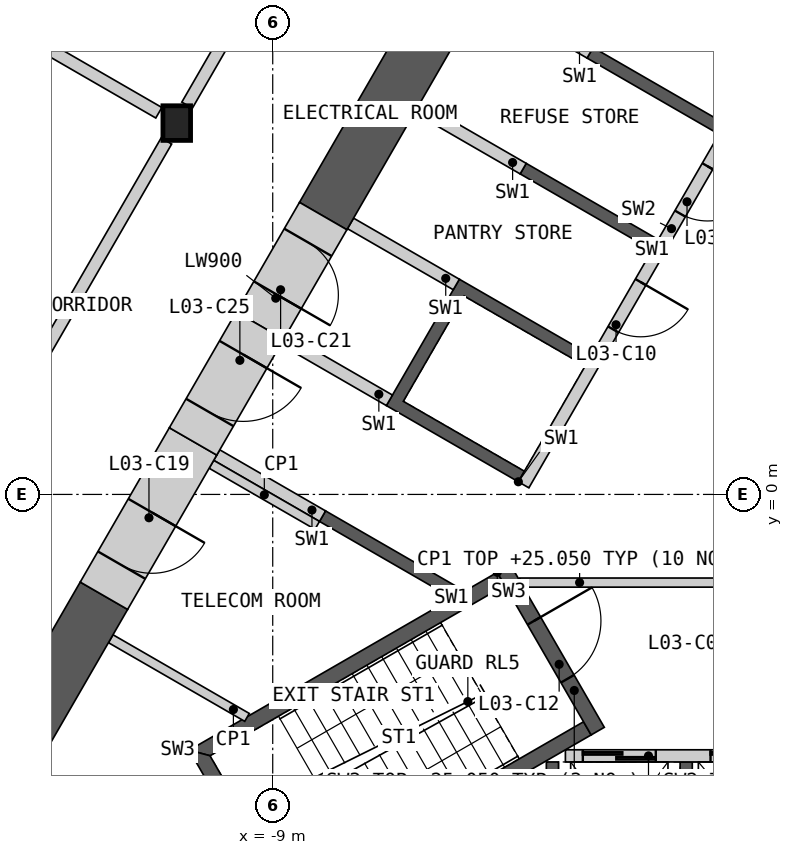
"""IFC4 building model, lengths in metres.
Left out: names, types, materials, properties, quantities, classifications, styles, units other than length and angle.
Written with IfcOpenShell. Run it as: python <this file> out.ifc"""

import sys

from ifc_helpers import new_model, si_unit, direction, frame, frame_2d, origin, origin_2d, place, context, subcontext, project, spatial, polyline, rectangle, i_section, outline, extrude, element, fill, save


model = new_model("IFC4")
c1 = context("Model", 3, precision=1e-05, world=origin(), true_north=direction((0.0, 1.0)))
c2 = subcontext(c1, "Body", "Model", "MODEL_VIEW")
j1 = project(units=[si_unit("LENGTHUNIT", "METRE"), si_unit("PLANEANGLEUNIT", "RADIAN")], contexts=[c1])
p1 = place(None, origin())
s1 = spatial("IfcSite", under=j1, at=p1, CompositionType="ELEMENT")
p2 = place(p1, origin())
s2 = spatial("IfcBuilding", under=s1, at=p2, CompositionType="ELEMENT")
p3 = place(p2, frame((0.0, 0.0, 21.0)))
s3 = spatial("IfcBuildingStorey", under=s2, at=p3, CompositionType="ELEMENT", Elevation=21.0)
p4 = place(p3, frame((-10.578, 6.107, 0.0), z_axis=(0.0, 0.0, 1.0), x_axis=(1.0, 0.0, 0.0)))
e1 = element("IfcColumn", 1, at=p4, inside=s3, PredefinedType="COLUMN", context=c2, shape_type="SweptSolid", body=[
    extrude(i_section(OverallWidth=0.454, OverallDepth=0.57, WebThickness=0.078, FlangeThickness=0.125, at=origin_2d()), origin(), (0.0, 0.0, 1.0), 4.5),
])
p5 = place(p3, origin())
e2 = element("IfcWall", 2, at=p5, inside=s3, PredefinedType="SHEAR", context=c2, shape_type="SweptSolid", body=[
    extrude(outline(polyline([(4.5, -4.4), (4.5, -6.906), (-4.5, -6.906), (-4.5, -4.4), (-4.3, -4.4), (-4.3, -6.7), (-2.3, -6.7), (-2.3, -4.4), (-2.1, -4.4), (-2.1, -6.7), (-0.1, -6.7), (-0.1, -4.4), (0.1, -4.4), (0.1, -6.7), (2.1, -6.7), (2.1, -4.4), (2.3, -4.4), (2.3, -6.7), (4.3, -6.7), (4.3, -4.4), (4.5, -4.4)])), origin(), (0.0, 0.0, 1.0), 4.05),
])
p6 = place(p3, frame((-4.187, -4.3, 0.0), z_axis=(0.0, 0.0, 1.0), x_axis=(1.0, 0.0, 0.0)))
e3 = element("IfcWall", 3, at=p6, inside=s3, PredefinedType="SOLIDWALL", context=c2, shape_type="SweptSolid", body=[
    extrude(rectangle(XDim=8.373, YDim=0.2, at=frame_2d((4.187, 0.0))), origin(), (0.0, 0.0, 1.0), 4.05),
])
p7 = place(p6, frame((0.287, 0.0, 0.0)))
e4 = element("IfcOpeningElement", 4, at=p7, cuts=e3, PredefinedType="OPENING", context=c2, shape_type="SweptSolid", body=[
    extrude(rectangle(XDim=1.2, YDim=2.1, at=frame_2d((0.6, 1.05))), frame((0.0, 0.11, 0.0), z_axis=(0.0, -1.0, 0.0), x_axis=(1.0, 0.0, 0.0)), (0.0, 0.0, 1.0), 0.22),
])
p8 = place(p6, frame((2.387, 0.0, 0.0)))
e5 = element("IfcOpeningElement", 5, at=p8, cuts=e3, PredefinedType="OPENING", context=c2, shape_type="SweptSolid", body=[
    extrude(rectangle(XDim=1.4, YDim=2.1, at=frame_2d((0.7, 1.05))), frame((0.0, 0.11, 0.0), z_axis=(0.0, -1.0, 0.0), x_axis=(1.0, 0.0, 0.0)), (0.0, 0.0, 1.0), 0.22),
])
p9 = place(p6, frame((4.737, 0.0, 0.0)))
e6 = element("IfcOpeningElement", 6, at=p9, cuts=e3, PredefinedType="OPENING", context=c2, shape_type="SweptSolid", body=[
    extrude(rectangle(XDim=1.1, YDim=2.1, at=frame_2d((0.55, 1.05))), frame((0.0, 0.11, 0.0), z_axis=(0.0, -1.0, 0.0), x_axis=(1.0, 0.0, 0.0)), (0.0, 0.0, 1.0), 0.22),
])
p10 = place(p6, frame((6.887, 0.0, 0.0)))
e7 = element("IfcOpeningElement", 7, at=p10, cuts=e3, PredefinedType="OPENING", context=c2, shape_type="SweptSolid", body=[
    extrude(rectangle(XDim=1.2, YDim=2.1, at=frame_2d((0.6, 1.05))), frame((0.0, 0.11, 0.0), z_axis=(0.0, -1.0, 0.0), x_axis=(1.0, 0.0, 0.0)), (0.0, 0.0, 1.0), 0.22),
])
p11 = place(p3, origin())
e8 = element("IfcWall", 8, at=p11, inside=s3, PredefinedType="SHEAR", context=c2, shape_type="SweptSolid", body=[
    extrude(outline(polyline([(-6.061, -1.697), (-8.231, -0.444), (-8.131, -0.271), (-5.96, -1.524), (-6.061, -1.697)])), origin(), (0.0, 0.0, 1.0), 4.05),
])
p12 = place(p3, origin())
e9 = element("IfcWall", 9, at=p12, inside=s3, PredefinedType="SHEAR", context=c2, shape_type="SweptSolid", body=[
    extrude(outline(polyline([(-4.96, 0.208), (-7.131, 1.461), (-5.931, 3.54), (-3.76, 2.287), (-3.861, 2.113), (-5.852, 3.263), (-6.852, 1.531), (-4.861, 0.381), (-4.96, 0.208)])), origin(), (0.0, 0.0, 1.0), 4.05),
])
p13 = place(p3, origin())
e10 = element("IfcWall", 10, at=p13, inside=s3, PredefinedType="SHEAR", context=c2, shape_type="SweptSolid", body=[
    extrude(outline(polyline([(-2.76, 4.019), (-4.931, 5.272), (-4.831, 5.445), (-2.66, 4.192), (-2.76, 4.019)])), origin(), (0.0, 0.0, 1.0), 4.05),
])
p14 = place(p3, origin())
e11 = element("IfcWall", 11, at=p14, inside=s3, PredefinedType="SHEAR", context=c2, shape_type="SweptSolid", body=[
    extrude(outline(polyline([(-3.731, 7.35), (-1.561, 6.097), (-1.66, 5.924), (-3.831, 7.177), (-3.731, 7.35)])), origin(), (0.0, 0.0, 1.0), 4.05),
])
p15 = place(p3, frame((-1.631, 5.776, 0.0), z_axis=(0.0, 0.0, 1.0), x_axis=(-0.499992876559, -0.866029516466, 0.0)))
e12 = element("IfcWall", 12, at=p15, inside=s3, PredefinedType="SOLIDWALL", context=c2, shape_type="SweptSolid", body=[
    extrude(rectangle(XDim=6.486, YDim=0.2, at=frame_2d((3.243, 0.0))), origin(), (0.0, 0.0, 1.0), 4.05),
])
p16 = place(p15, frame((0.437, 0.0, 0.0)))
e13 = element("IfcOpeningElement", 13, at=p16, cuts=e12, PredefinedType="OPENING", context=c2, shape_type="SweptSolid", body=[
    extrude(rectangle(XDim=0.9, YDim=2.1, at=frame_2d((0.45, 1.05))), frame((0.0, 0.11, 0.0), z_axis=(0.0, -1.0, 0.0), x_axis=(1.0, 0.0, 0.0)), (0.0, 0.0, 1.0), 0.22),
])
p17 = place(p15, frame((2.637, 0.0, 0.0)))
e14 = element("IfcOpeningElement", 14, at=p17, cuts=e12, PredefinedType="OPENING", context=c2, shape_type="SweptSolid", body=[
    extrude(rectangle(XDim=0.9, YDim=2.1, at=frame_2d((0.45, 1.05))), frame((0.0, 0.11, 0.0), z_axis=(0.0, -1.0, 0.0), x_axis=(1.0, 0.0, 0.0)), (0.0, 0.0, 1.0), 0.22),
])
p18 = place(p3, frame((-3.781, 7.263, 0.0), z_axis=(0.0, 0.0, 1.0), x_axis=(-0.865983199114, 0.50007309351, 0.0)))
e15 = element("IfcWall", 15, at=p18, inside=s3, PredefinedType="SHEAR", context=c2, shape_type="SweptSolid", body=[
    extrude(rectangle(XDim=2.009, YDim=0.2, at=frame_2d((1.004, 0.0))), origin(), (0.0, 0.0, 1.0), 4.05),
])
p19 = place(p3, frame((-4.881, 5.358, 0.0), z_axis=(0.0, 0.0, 1.0), x_axis=(-0.866035824272, 0.499981950752, 0.0)))
e16 = element("IfcWall", 16, at=p19, inside=s3, PredefinedType="SHEAR", context=c2, shape_type="SweptSolid", body=[
    extrude(rectangle(XDim=2.009, YDim=0.2, at=frame_2d((1.004, 0.0))), origin(), (0.0, 0.0, 1.0), 4.05),
])
p20 = place(p3, frame((-5.981, 3.453, 0.0), z_axis=(0.0, 0.0, 1.0), x_axis=(-0.866013584312, 0.500020471368, 0.0)))
e17 = element("IfcWall", 17, at=p20, inside=s3, PredefinedType="SHEAR", context=c2, shape_type="SweptSolid", body=[
    extrude(rectangle(XDim=2.009, YDim=0.2, at=frame_2d((1.005, 0.0))), origin(), (0.0, 0.0, 1.0), 4.05),
])
p21 = place(p3, frame((-7.081, 1.548, 0.0), z_axis=(0.0, 0.0, 1.0), x_axis=(-0.865983199114, 0.50007309351, 0.0)))
e18 = element("IfcWall", 18, at=p21, inside=s3, PredefinedType="SHEAR", context=c2, shape_type="SweptSolid", body=[
    extrude(rectangle(XDim=2.009, YDim=0.2, at=frame_2d((1.004, 0.0))), origin(), (0.0, 0.0, 1.0), 4.05),
])
p22 = place(p3, frame((-8.181, -0.357, 0.0), z_axis=(0.0, 0.0, 1.0), x_axis=(-0.866035824272, 0.499981950752, 0.0)))
e19 = element("IfcWall", 19, at=p22, inside=s3, PredefinedType="SHEAR", context=c2, shape_type="SweptSolid", body=[
    extrude(rectangle(XDim=2.009, YDim=0.2, at=frame_2d((1.004, 0.0))), origin(), (0.0, 0.0, 1.0), 4.05),
])
p23 = place(p3, frame((-4.941, -1.45, 0.0), z_axis=(0.0, 0.0, 1.0), x_axis=(1.0, 0.0, 0.0)))
e20 = element("IfcWall", 20, at=p23, inside=s3, PredefinedType="PARTITIONING", context=c2, shape_type="SweptSolid", body=[
    extrude(rectangle(XDim=9.882, YDim=0.15, at=frame_2d((4.941, 0.0))), origin(), (0.0, 0.0, 1.0), 4.05),
])
p24 = place(p23, frame((4.391, 0.0, 0.0)))
e21 = element("IfcOpeningElement", 21, at=p24, cuts=e20, PredefinedType="OPENING", context=c2, shape_type="SweptSolid", body=[
    extrude(rectangle(XDim=1.1, YDim=2.1, at=frame_2d((0.55, 1.05))), frame((0.0, 0.085, 0.0), z_axis=(0.0, -1.0, 0.0), x_axis=(1.0, 0.0, 0.0)), (0.0, 0.0, 1.0), 0.17),
])
p25 = place(p3, origin())
e22 = element("IfcWall", 22, at=p25, inside=s3, PredefinedType="SHEAR", context=c2, shape_type="SweptSolid", body=[
    extrude(outline(polyline([(-5.307, -1.281), (-10.374, -4.206), (-10.032, -4.298), (-5.182, -1.498), (-5.307, -1.281)])), origin(), (0.0, 0.0, 1.0), 4.05),
])
p26 = place(p3, origin())
e23 = element("IfcWall", 23, at=p26, inside=s3, PredefinedType="SHEAR", context=c2, shape_type="SweptSolid", body=[
    extrude(outline(polyline([(-10.374, -4.206), (-8.83, -6.881), (-8.738, -6.539), (-10.032, -4.298), (-10.374, -4.206)])), origin(), (0.0, 0.0, 1.0), 4.05),
])
p27 = place(p3, origin())
e24 = element("IfcWall", 24, at=p27, inside=s3, PredefinedType="SHEAR", context=c2, shape_type="SweptSolid", body=[
    extrude(outline(polyline([(-8.738, -6.539), (-8.83, -6.881), (-3.763, -3.956), (-3.888, -3.739), (-8.738, -6.539)])), origin(), (0.0, 0.0, 1.0), 4.05),
])
p28 = place(p3, frame((-5.199, -1.219, 0.0), z_axis=(0.0, 0.0, 1.0), x_axis=(0.499982516597, -0.866035497597, 0.0)))
e25 = element("IfcWall", 25, at=p28, inside=s3, PredefinedType="SHEAR", context=c2, shape_type="SweptSolid", body=[
    extrude(rectangle(XDim=3.088, YDim=0.25, at=frame_2d((1.544, 0.0))), origin(), (0.0, 0.0, 1.0), 4.05),
])
p29 = place(p28, frame((0.994, 0.0, 0.0)))
e26 = element("IfcOpeningElement", 26, at=p29, cuts=e25, PredefinedType="OPENING", context=c2, shape_type="SweptSolid", body=[
    extrude(rectangle(XDim=1.1, YDim=2.1, at=frame_2d((0.55, 1.05))), frame((0.0, 0.135, 0.0), z_axis=(0.0, -1.0, 0.0), x_axis=(1.0, 0.0, 0.0)), (0.0, 0.0, 1.0), 0.27),
])
p30 = place(p3, frame((-8.268, -0.509, 0.0), z_axis=(0.0, 0.0, 1.0), x_axis=(-0.866035824272, 0.499981950752, 0.0)))
e27 = element("IfcWall", 27, at=p30, inside=s3, PredefinedType="PARTITIONING", context=c2, shape_type="SweptSolid", body=[
    extrude(rectangle(XDim=2.009, YDim=0.15, at=frame_2d((1.004, 0.0))), origin(), (0.0, 0.0, 1.0), 4.05),
])
p31 = place(p3, frame((-11.664, -2.373, 0.0), z_axis=(0.0, 0.0, 1.0), x_axis=(0.866075643493, -0.499912972175, 0.0)))
e28 = element("IfcWall", 28, at=p31, inside=s3, PredefinedType="PARTITIONING", context=c2, shape_type="SweptSolid", body=[
    extrude(rectangle(XDim=2.588, YDim=0.15, at=frame_2d((1.294, 0.0))), origin(), (0.0, 0.0, 1.0), 4.05),
])
p32 = place(p3, frame((-11.776, -1.667, 0.0), z_axis=(0.0, 0.0, 1.0), x_axis=(-0.499995201193, -0.866028174359, 0.0)))
e29 = element("IfcWall", 29, at=p32, inside=s3, PredefinedType="SHEAR", context=c2, shape_type="SweptSolid", body=[
    extrude(rectangle(XDim=8.11, YDim=0.9, at=frame_2d((4.055, 0.0))), origin(), (0.0, 0.0, 1.0), 4.05),
])
p33 = place(p3, frame((-4.466, 10.995, 0.0), z_axis=(0.0, 0.0, 1.0), x_axis=(-0.500012427149, -0.866018228848, 0.0)))
e30 = element("IfcWall", 30, at=p33, inside=s3, PredefinedType="SHEAR", context=c2, shape_type="SweptSolid", body=[
    extrude(rectangle(XDim=7.409, YDim=0.9, at=frame_2d((3.705, 0.0))), origin(), (0.0, 0.0, 1.0), 4.05),
])
p34 = place(p3, frame((-10.31, 0.872, 0.0), z_axis=(0.0, 0.0, 1.0), x_axis=(-0.499982003349, -0.866035793907, 0.0)))
e31 = element("IfcWall", 31, at=p34, inside=s3, PredefinedType="SHEAR", context=c2, shape_type="SweptSolid", body=[
    extrude(rectangle(XDim=2.931, YDim=0.9, at=frame_2d((1.466, 0.0))), origin(), (0.0, 0.0, 1.0), 4.05),
])
p35 = place(p34, frame((1.35, 0.0, 0.0)))
e32 = element("IfcOpeningElement", 32, at=p35, cuts=e31, PredefinedType="OPENING", context=c2, shape_type="SweptSolid", body=[
    extrude(rectangle(XDim=1.0, YDim=2.1, at=frame_2d((0.5, 1.05))), frame((0.0, 0.46, 0.0), z_axis=(0.0, -1.0, 0.0), x_axis=(1.0, 0.0, 0.0)), (0.0, 0.0, 1.0), 0.92),
])
p36 = place(p3, frame((-8.17, 4.579, 0.0), z_axis=(0.0, 0.0, 1.0), x_axis=(-0.499888406853, -0.866089822532, 0.0)))
e33 = element("IfcWall", 33, at=p36, inside=s3, PredefinedType="SHEAR", context=c2, shape_type="SweptSolid", body=[
    extrude(rectangle(XDim=2.08, YDim=0.9, at=frame_2d((1.04, 0.0))), origin(), (0.0, 0.0, 1.0), 4.05),
])
p37 = place(p36, frame((0.5, 0.0, 0.0)))
e34 = element("IfcOpeningElement", 34, at=p37, cuts=e33, PredefinedType="OPENING", context=c2, shape_type="SweptSolid", body=[
    extrude(rectangle(XDim=1.0, YDim=2.1, at=frame_2d((0.5, 1.05))), frame((0.0, 0.46, 0.0), z_axis=(0.0, -1.0, 0.0), x_axis=(1.0, 0.0, 0.0)), (0.0, 0.0, 1.0), 0.92),
])
p38 = place(p3, frame((-9.21, 2.777, 0.0), z_axis=(0.0, 0.0, 1.0), x_axis=(-0.500077893725, -0.86598042715, 0.0)))
e35 = element("IfcWall", 35, at=p38, inside=s3, PredefinedType="SHEAR", context=c2, shape_type="SweptSolid", body=[
    extrude(rectangle(XDim=2.2, YDim=0.9, at=frame_2d((1.1, 0.0))), origin(), (0.0, 0.0, 1.0), 4.05),
])
p39 = place(p38, frame((0.55, 0.0, 0.0)))
e36 = element("IfcOpeningElement", 36, at=p39, cuts=e35, PredefinedType="OPENING", context=c2, shape_type="SweptSolid", body=[
    extrude(rectangle(XDim=1.1, YDim=2.1, at=frame_2d((0.55, 1.05))), frame((0.0, 0.46, 0.0), z_axis=(0.0, -1.0, 0.0), x_axis=(1.0, 0.0, 0.0)), (0.0, 0.0, 1.0), 0.92),
])
p40 = place(p3, frame((-15.698, -2.759, 0.0), z_axis=(0.0, 0.0, 1.0), x_axis=(0.500004292778, 0.866022925334, 0.0)))
e37 = element("IfcWall", 37, at=p40, inside=s3, PredefinedType="PARTITIONING", context=c2, shape_type="SweptSolid", body=[
    extrude(rectangle(XDim=9.898, YDim=0.2, at=frame_2d((4.949, 0.0))), origin(), (0.0, 0.0, 1.0), 4.05),
])
p41 = place(p40, frame((4.1, 0.0, 0.0)))
e38 = element("IfcOpeningElement", 38, at=p41, cuts=e37, PredefinedType="OPENING", context=c2, shape_type="SweptSolid", body=[
    extrude(rectangle(XDim=1.8, YDim=2.1, at=frame_2d((0.9, 1.05))), frame((0.0, 0.11, 0.0), z_axis=(0.0, -1.0, 0.0), x_axis=(1.0, 0.0, 0.0)), (0.0, 0.0, 1.0), 0.22),
])
p42 = place(p3, frame((-10.408, 6.402, 0.0), z_axis=(0.0, 0.0, 1.0), x_axis=(0.499986904098, 0.866032964575, 0.0)))
e39 = element("IfcWall", 39, at=p42, inside=s3, PredefinedType="PARTITIONING", context=c2, shape_type="SweptSolid", body=[
    extrude(rectangle(XDim=9.67, YDim=0.2, at=frame_2d((4.835, 0.0))), origin(), (0.0, 0.0, 1.0), 4.05),
])
p43 = place(p42, frame((3.884, 0.0, 0.0)))
e40 = element("IfcOpeningElement", 40, at=p43, cuts=e39, PredefinedType="OPENING", context=c2, shape_type="SweptSolid", body=[
    extrude(rectangle(XDim=1.8, YDim=2.1, at=frame_2d((0.9, 1.05))), frame((0.0, 0.11, 0.0), z_axis=(0.0, -1.0, 0.0), x_axis=(1.0, 0.0, 0.0)), (0.0, 0.0, 1.0), 0.22),
])
p44 = place(p3, frame((-19.31, 11.148, 0.0), z_axis=(0.0, 0.0, 1.0), x_axis=(0.866029077831, -0.499993636311, 0.0)))
e41 = element("IfcWall", 41, at=p44, inside=s3, PredefinedType="PARTITIONING", context=c2, shape_type="SweptSolid", body=[
    extrude(rectangle(XDim=9.741, YDim=0.2, at=frame_2d((4.871, 0.0))), origin(), (0.0, 0.0, 1.0), 4.05),
])
p45 = place(p7, origin())
e42 = element("IfcDoor", 42, at=p45, inside=s3, OperationType="SLIDING_TO_LEFT", PredefinedType="DOOR", context=c2, shape_type="SweptSolid", body=[
    extrude(rectangle(XDim=1.2, YDim=2.1, at=frame_2d((0.6, 1.05))), frame((0.0, 0.025, 0.0), z_axis=(0.0, -1.0, 0.0), x_axis=(1.0, 0.0, 0.0)), (0.0, 0.0, 1.0), 0.05),
])
fill(e4, e42)
p46 = place(p8, origin())
e43 = element("IfcDoor", 43, at=p46, inside=s3, OperationType="SLIDING_TO_LEFT", PredefinedType="DOOR", context=c2, shape_type="SweptSolid", body=[
    extrude(rectangle(XDim=1.4, YDim=2.1, at=frame_2d((0.7, 1.05))), frame((0.0, 0.025, 0.0), z_axis=(0.0, -1.0, 0.0), x_axis=(1.0, 0.0, 0.0)), (0.0, 0.0, 1.0), 0.05),
])
fill(e5, e43)
p47 = place(p16, origin())
e44 = element("IfcDoor", 44, at=p47, inside=s3, OperationType="SINGLE_SWING_LEFT", PredefinedType="DOOR", context=c2, shape_type="SweptSolid", body=[
    extrude(rectangle(XDim=0.9, YDim=2.1, at=frame_2d((0.45, 1.05))), frame((0.0, 0.025, 0.0), z_axis=(0.0, -1.0, 0.0), x_axis=(1.0, 0.0, 0.0)), (0.0, 0.0, 1.0), 0.05),
])
fill(e13, e44)
p48 = place(p17, origin())
e45 = element("IfcDoor", 45, at=p48, inside=s3, OperationType="SINGLE_SWING_LEFT", PredefinedType="DOOR", context=c2, shape_type="SweptSolid", body=[
    extrude(rectangle(XDim=0.9, YDim=2.1, at=frame_2d((0.45, 1.05))), frame((0.0, 0.025, 0.0), z_axis=(0.0, -1.0, 0.0), x_axis=(1.0, 0.0, 0.0)), (0.0, 0.0, 1.0), 0.05),
])
fill(e14, e45)
p49 = place(p29, origin())
e46 = element("IfcDoor", 46, at=p49, inside=s3, OperationType="SINGLE_SWING_LEFT", PredefinedType="DOOR", context=c2, shape_type="SweptSolid", body=[
    extrude(rectangle(XDim=1.1, YDim=2.1, at=frame_2d((0.55, 1.05))), frame((0.0, 0.025, 0.0), z_axis=(0.0, -1.0, 0.0), x_axis=(1.0, 0.0, 0.0)), (0.0, 0.0, 1.0), 0.05),
])
fill(e26, e46)
p50 = place(p35, origin())
e47 = element("IfcDoor", 47, at=p50, inside=s3, OperationType="SINGLE_SWING_LEFT", PredefinedType="DOOR", context=c2, shape_type="SweptSolid", body=[
    extrude(rectangle(XDim=1.0, YDim=2.1, at=frame_2d((0.5, 1.05))), frame((0.0, 0.205, 0.0), z_axis=(0.0, -1.0, 0.0), x_axis=(1.0, 0.0, 0.0)), (0.0, 0.0, 1.0), 0.05),
])
fill(e32, e47)
p51 = place(p37, origin())
e48 = element("IfcDoor", 48, at=p51, inside=s3, OperationType="SINGLE_SWING_RIGHT", PredefinedType="DOOR", context=c2, shape_type="SweptSolid", body=[
    extrude(rectangle(XDim=1.0, YDim=2.1, at=frame_2d((0.5, 1.05))), frame((0.0, 0.205, 0.0), z_axis=(0.0, -1.0, 0.0), x_axis=(1.0, 0.0, 0.0)), (0.0, 0.0, 1.0), 0.05),
])
fill(e34, e48)
p52 = place(p39, origin())
e49 = element("IfcDoor", 49, at=p52, inside=s3, OperationType="SINGLE_SWING_LEFT", PredefinedType="DOOR", context=c2, shape_type="SweptSolid", body=[
    extrude(rectangle(XDim=1.1, YDim=2.1, at=frame_2d((0.55, 1.05))), frame((0.0, 0.205, 0.0), z_axis=(0.0, -1.0, 0.0), x_axis=(1.0, 0.0, 0.0)), (0.0, 0.0, 1.0), 0.05),
])
fill(e36, e49)
save(model, sys.argv[1])
